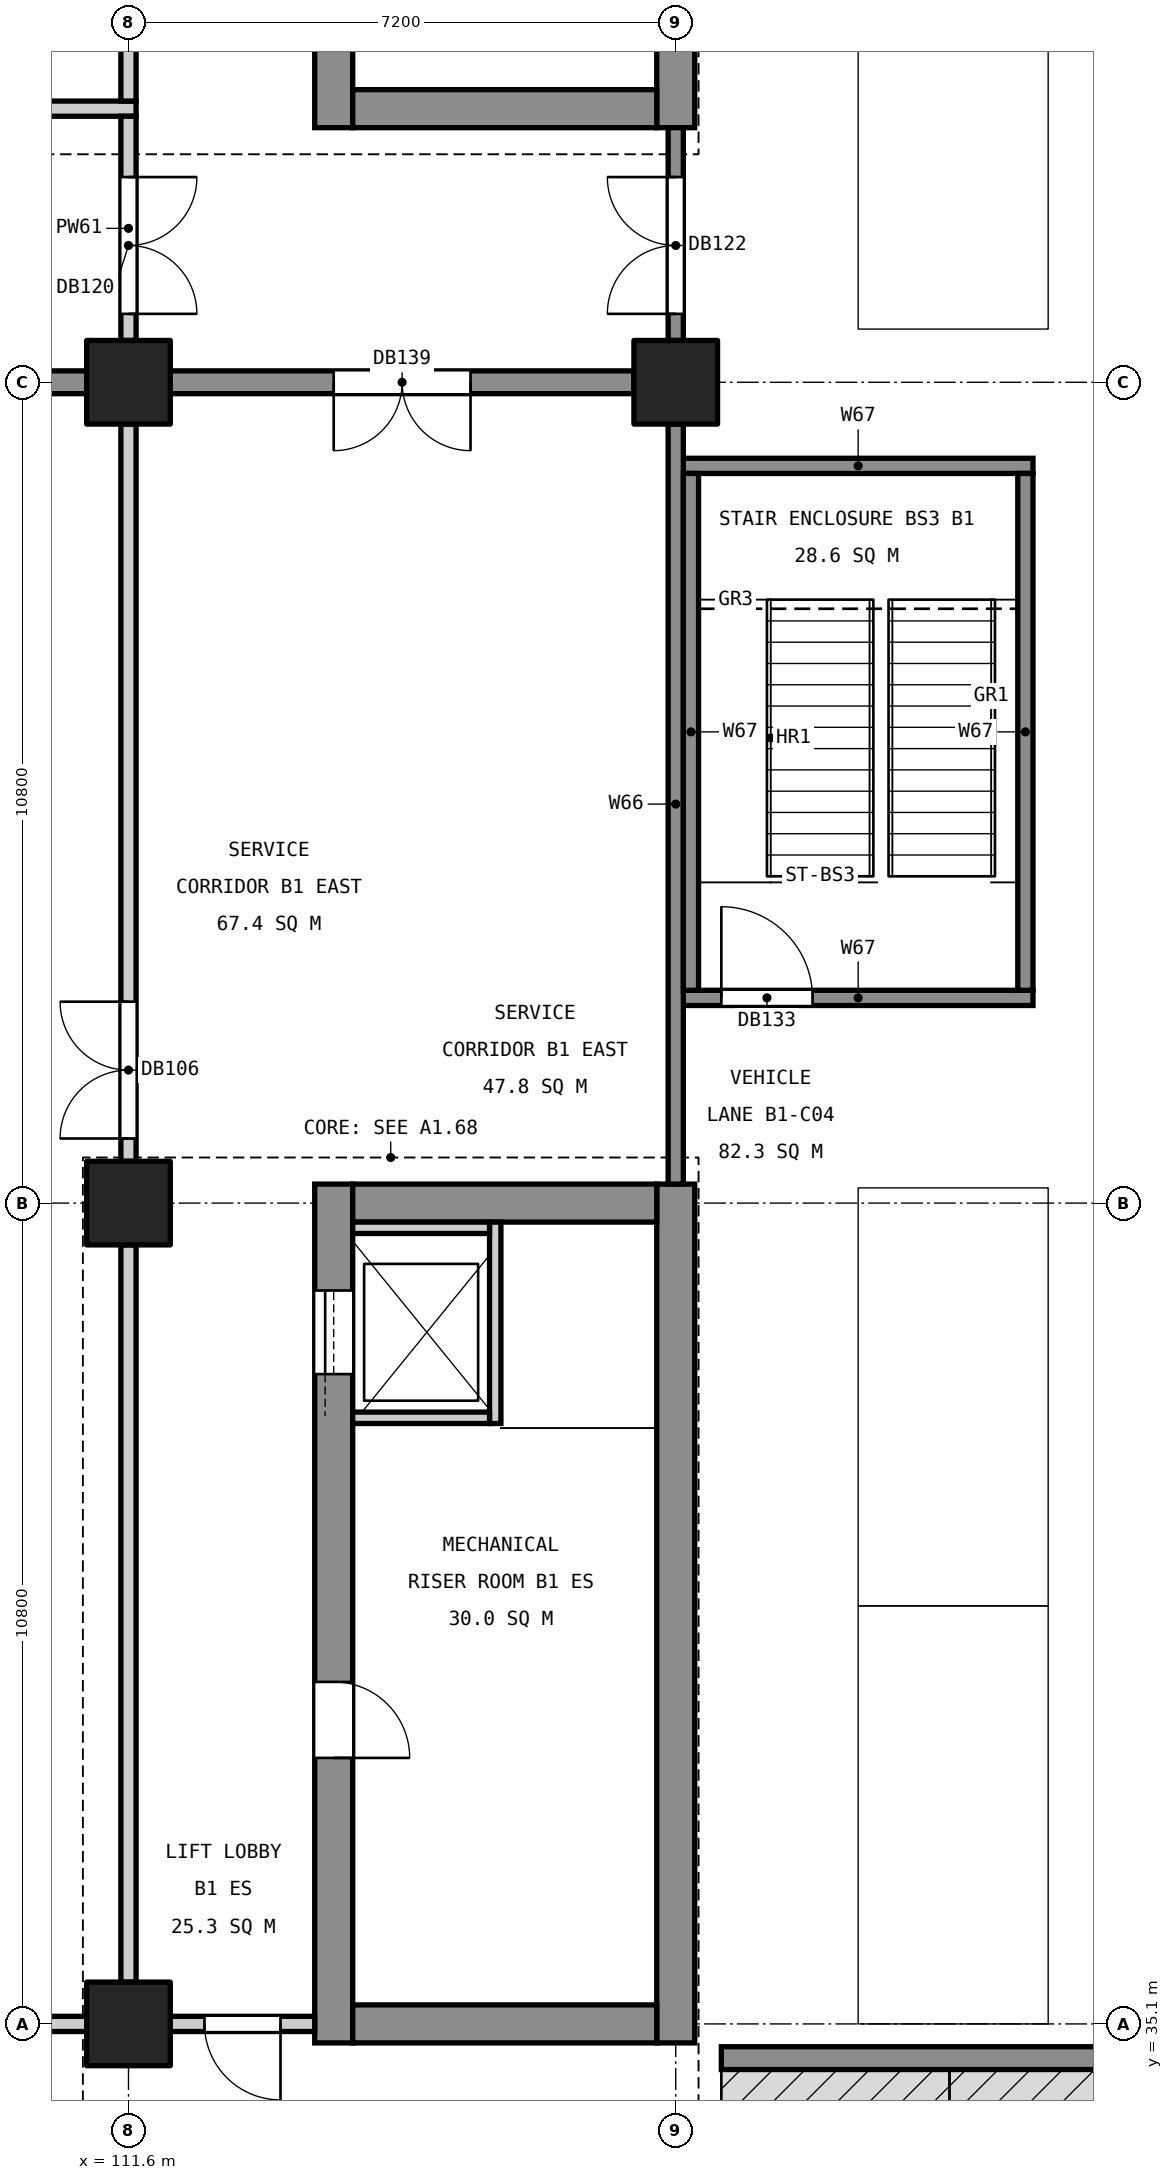
"""IFC4 building model, lengths in metres.
Left out: names, types, materials, properties, quantities, classifications, styles, units other than length and angle.
Written with IfcOpenShell. Run it as: python <this file> out.ifc"""

import sys

from ifc_helpers import new_model, si_unit, direction, frame, frame_2d, origin, origin_2d, place, context, subcontext, project, spatial, polyline, rectangle, outline, extrude, element, fill, save


model = new_model("IFC4")
c1 = context("Model", 3, precision=1e-05, world=origin(), true_north=direction((0.0, 1.0)))
c2 = subcontext(c1, "Body", "Model", "MODEL_VIEW")
j1 = project(units=[si_unit("LENGTHUNIT", "METRE"), si_unit("PLANEANGLEUNIT", "RADIAN")], contexts=[c1])
p1 = place(None, origin())
s1 = spatial("IfcSite", under=j1, at=p1, CompositionType="ELEMENT")
p2 = place(p1, origin())
s2 = spatial("IfcBuilding", under=s1, at=p2, CompositionType="ELEMENT")
p3 = place(p2, frame((0.0, 0.0, -4.8)))
s3 = spatial("IfcBuildingStorey", under=s2, at=p3, CompositionType="ELEMENT", Elevation=-4.8)
for number, where, z_axis, x_axis in (
    (1, (118.8, 56.7, 0.0), (0.0, 0.0, 1.0), (1.0, 0.0, 0.0)),
    (2, (111.6, 35.1, 0.0), (0.0, 0.0, 1.0), (1.0, 0.0, 0.0)),
    (3, (111.6, 45.9, 0.0), (0.0, 0.0, 1.0), (1.0, 0.0, 0.0)),
    (4, (111.6, 56.7, 0.0), (0.0, 0.0, 1.0), (1.0, 0.0, 0.0)),
):
    element("IfcColumn", number, at=place(p3, frame(where, z_axis=z_axis, x_axis=x_axis)), inside=s3, PredefinedType="COLUMN", context=c2, shape_type="SweptSolid", body=[
        extrude(rectangle(XDim=1.1, YDim=1.1, at=origin_2d()), origin(), (0.0, 0.0, 1.0), 4.5),
    ])
p4 = place(p3, frame((118.8, 34.85, 0.0), z_axis=(0.0, 0.0, 1.0), x_axis=(0.0, 1.0, 0.0)))
e5 = element("IfcWall", 5, at=p4, inside=s3, PredefinedType="SHEAR", context=c2, shape_type="SweptSolid", body=[
    extrude(rectangle(XDim=11.3, YDim=0.5, at=frame_2d((5.65, 0.0))), origin(), (0.0, 0.0, 1.0), 4.5),
])
p5 = place(p3, frame((114.3, 34.85, 0.0), z_axis=(0.0, 0.0, 1.0), x_axis=(0.0, 1.0, 0.0)))
e6 = element("IfcWall", 6, at=p5, inside=s3, PredefinedType="SHEAR", context=c2, shape_type="SweptSolid", body=[
    extrude(rectangle(XDim=11.3, YDim=0.5, at=frame_2d((5.65, 0.0))), origin(), (0.0, 0.0, 1.0), 4.5),
])
p6 = place(p5, frame((8.8, 0.0, 0.0)))
e7 = element("IfcOpeningElement", 7, at=p6, cuts=e6, PredefinedType="OPENING", context=c2, shape_type="SweptSolid", body=[
    extrude(rectangle(XDim=1.1, YDim=2.1, at=frame_2d((0.55, 1.05))), frame((0.0, 0.26, 0.0), z_axis=(0.0, -1.0, 0.0), x_axis=(1.0, 0.0, 0.0)), (0.0, 0.0, 1.0), 0.52),
])
p7 = place(p5, frame((3.75, 0.0, 0.0)))
e8 = element("IfcOpeningElement", 8, at=p7, cuts=e6, PredefinedType="OPENING", context=c2, shape_type="SweptSolid", body=[
    extrude(rectangle(XDim=1.0, YDim=2.1, at=frame_2d((0.5, 1.05))), frame((0.0, 0.26, 0.0), z_axis=(0.0, -1.0, 0.0), x_axis=(1.0, 0.0, 0.0)), (0.0, 0.0, 1.0), 0.52),
])
for number, where, z_axis, x_axis in (
    (9, (118.55, 35.1, 0.0), (0.0, 0.0, 1.0), (-1.0, 0.0, 0.0)),
    (10, (118.55, 45.9, 0.0), (0.0, 0.0, 1.0), (-1.0, 0.0, 0.0)),
):
    element("IfcWall", number, at=place(p3, frame(where, z_axis=z_axis, x_axis=x_axis)), inside=s3, PredefinedType="SHEAR", context=c2, shape_type="SweptSolid", body=[
        extrude(rectangle(XDim=4.0, YDim=0.5, at=frame_2d((2.0, 0.0))), origin(), (0.0, 0.0, 1.0), 4.5),
    ])
p8 = place(p3, frame((118.8, 60.05, 0.0), z_axis=(0.0, 0.0, 1.0), x_axis=(0.0, 1.0, 0.0)))
e11 = element("IfcWall", 11, at=p8, inside=s3, PredefinedType="SHEAR", context=c2, shape_type="SweptSolid", body=[
    extrude(rectangle(XDim=14.9, YDim=0.5, at=frame_2d((7.45, 0.0))), origin(), (0.0, 0.0, 1.0), 4.5),
])
p9 = place(p3, frame((114.3, 60.05, 0.0), z_axis=(0.0, 0.0, 1.0), x_axis=(0.0, 1.0, 0.0)))
e12 = element("IfcWall", 12, at=p9, inside=s3, PredefinedType="SHEAR", context=c2, shape_type="SweptSolid", body=[
    extrude(rectangle(XDim=14.9, YDim=0.5, at=frame_2d((7.45, 0.0))), origin(), (0.0, 0.0, 1.0), 4.5),
])
p10 = place(p9, frame((8.85, 0.0, 0.0)))
e13 = element("IfcOpeningElement", 13, at=p10, cuts=e12, PredefinedType="OPENING", context=c2, shape_type="SweptSolid", body=[
    extrude(rectangle(XDim=1.1, YDim=2.1, at=frame_2d((0.55, 1.05))), frame((0.0, 0.26, 0.0), z_axis=(0.0, -1.0, 0.0), x_axis=(1.0, 0.0, 0.0)), (0.0, 0.0, 1.0), 0.52),
])
p11 = place(p9, frame((11.4, 0.0, 0.0)))
e14 = element("IfcOpeningElement", 14, at=p11, cuts=e12, PredefinedType="OPENING", context=c2, shape_type="SweptSolid", body=[
    extrude(rectangle(XDim=1.1, YDim=2.1, at=frame_2d((0.55, 1.05))), frame((0.0, 0.26, 0.0), z_axis=(0.0, -1.0, 0.0), x_axis=(1.0, 0.0, 0.0)), (0.0, 0.0, 1.0), 0.52),
])
p12 = place(p9, frame((3.75, 0.0, 0.0)))
e15 = element("IfcOpeningElement", 15, at=p12, cuts=e12, PredefinedType="OPENING", context=c2, shape_type="SweptSolid", body=[
    extrude(rectangle(XDim=1.0, YDim=2.1, at=frame_2d((0.5, 1.05))), frame((0.0, 0.26, 0.0), z_axis=(0.0, -1.0, 0.0), x_axis=(1.0, 0.0, 0.0)), (0.0, 0.0, 1.0), 0.52),
])
p13 = place(p3, frame((118.55, 60.3, 0.0), z_axis=(0.0, 0.0, 1.0), x_axis=(-1.0, 0.0, 0.0)))
e16 = element("IfcWall", 16, at=p13, inside=s3, PredefinedType="SHEAR", context=c2, shape_type="SweptSolid", body=[
    extrude(rectangle(XDim=4.0, YDim=0.5, at=frame_2d((2.0, 0.0))), origin(), (0.0, 0.0, 1.0), 4.5),
])
p14 = place(p3, frame((118.25, 56.7, 0.0), z_axis=(0.0, 0.0, 1.0), x_axis=(-1.0, 0.0, 0.0)))
e17 = element("IfcWall", 17, at=p14, inside=s3, PredefinedType="SHEAR", context=c2, shape_type="SweptSolid", body=[
    extrude(rectangle(XDim=6.1, YDim=0.3, at=frame_2d((3.05, 0.0))), origin(), (0.0, 0.0, 1.0), 4.5),
])
p15 = place(p14, frame((2.15, 0.0, 0.0)))
e18 = element("IfcOpeningElement", 18, at=p15, cuts=e17, PredefinedType="OPENING", context=c2, shape_type="SweptSolid", body=[
    extrude(rectangle(XDim=1.8, YDim=2.1, at=frame_2d((0.9, 1.05))), frame((0.0, 0.16, 0.0), z_axis=(0.0, -1.0, 0.0), x_axis=(1.0, 0.0, 0.0)), (0.0, 0.0, 1.0), 0.32),
])
p16 = place(p3, frame((111.05, 56.7, 0.0), z_axis=(0.0, 0.0, 1.0), x_axis=(-1.0, 0.0, 0.0)))
e19 = element("IfcWall", 19, at=p16, inside=s3, PredefinedType="SHEAR", context=c2, shape_type="SweptSolid", body=[
    extrude(rectangle(XDim=9.7, YDim=0.3, at=frame_2d((4.85, 0.0))), origin(), (0.0, 0.0, 1.0), 4.5),
])
p17 = place(p3, frame((116.425, 43.0, 0.0), z_axis=(0.0, 0.0, 1.0), x_axis=(0.0, 1.0, 0.0)))
e20 = element("IfcWall", 20, at=p17, inside=s3, PredefinedType="SOLIDWALL", context=c2, shape_type="SweptSolid", body=[
    extrude(rectangle(XDim=2.65, YDim=0.15, at=frame_2d((1.325, 0.0))), origin(), (0.0, 0.0, 1.0), 4.8),
])
for number, where, z_axis, x_axis in (
    (21, (116.35, 43.075, 0.0), (0.0, 0.0, 1.0), (-1.0, 0.0, 0.0)),
    (22, (116.35, 45.575, 0.0), (0.0, 0.0, 1.0), (-1.0, 0.0, 0.0)),
):
    element("IfcWall", number, at=place(p3, frame(where, z_axis=z_axis, x_axis=x_axis)), inside=s3, PredefinedType="SOLIDWALL", context=c2, shape_type="SweptSolid", body=[
        extrude(rectangle(XDim=1.8, YDim=0.15, at=frame_2d((0.9, 0.0))), origin(), (0.0, 0.0, 1.0), 4.8),
    ])
p18 = place(p3, frame((151.2, 34.65, 0.0), z_axis=(0.0, 0.0, 1.0), x_axis=(-1.0, 0.0, 0.0)))
e23 = element("IfcWall", 23, at=p18, inside=s3, PredefinedType="SOLIDWALL", context=c2, shape_type="SweptSolid", body=[
    extrude(outline(polyline([(0.0, 0.0), (31.8, 0.0), (31.8, 1.1), (31.0, 1.167), (30.0, 1.25), (29.0, 1.333), (28.8, 1.35), (28.0, 1.483), (27.0, 1.65), (26.0, 1.817), (25.0, 1.983), (24.0, 2.15), (23.0, 2.317), (22.0, 2.483), (21.0, 2.65), (20.0, 2.817), (19.0, 2.983), (18.0, 3.15), (17.0, 3.317), (16.9, 3.333), (16.0, 3.483), (15.0, 3.65), (14.0, 3.817), (13.0, 3.983), (12.0, 4.15), (11.0, 4.317), (10.0, 4.483), (9.0, 4.65), (8.0, 4.817), (7.0, 4.983), (6.0, 5.15), (5.0, 5.317), (4.0, 5.483), (3.0, 5.65), (2.0, 5.733), (1.0, 5.817), (0.0, 5.9), (0.0, 0.0)])), frame((0.0, 0.15, 0.0), z_axis=(0.0, -1.0, 0.0), x_axis=(1.0, 0.0, 0.0)), (0.0, 0.0, 1.0), 0.3),
])
p19 = place(p3, frame((101.35, 35.1, 0.0), z_axis=(0.0, 0.0, 1.0), x_axis=(1.0, 0.0, 0.0)))
e24 = element("IfcWall", 24, at=p19, inside=s3, PredefinedType="PARTITIONING", context=c2, shape_type="SweptSolid", body=[
    extrude(rectangle(XDim=9.7, YDim=0.2, at=frame_2d((4.85, 0.0))), origin(), (0.0, 0.0, 1.0), 3.7),
])
p20 = place(p3, frame((112.15, 35.1, 0.0), z_axis=(0.0, 0.0, 1.0), x_axis=(1.0, 0.0, 0.0)))
e25 = element("IfcWall", 25, at=p20, inside=s3, PredefinedType="PARTITIONING", context=c2, shape_type="SweptSolid", body=[
    extrude(rectangle(XDim=1.9, YDim=0.2, at=frame_2d((0.95, 0.0))), origin(), (0.0, 0.0, 1.0), 3.7),
])
p21 = place(p20, frame((0.45, 0.0, 0.0)))
e26 = element("IfcOpeningElement", 26, at=p21, cuts=e25, PredefinedType="OPENING", context=c2, shape_type="SweptSolid", body=[
    extrude(rectangle(XDim=1.0, YDim=2.1, at=frame_2d((0.5, 1.05))), frame((0.0, 0.11, 0.0), z_axis=(0.0, -1.0, 0.0), x_axis=(1.0, 0.0, 0.0)), (0.0, 0.0, 1.0), 0.22),
])
p22 = place(p3, frame((118.9, 48.6, 0.0), z_axis=(0.0, 0.0, 1.0), x_axis=(1.0, 0.0, 0.0)))
e27 = element("IfcWall", 27, at=p22, inside=s3, PredefinedType="SOLIDWALL", context=c2, shape_type="SweptSolid", body=[
    extrude(rectangle(XDim=4.6, YDim=0.2, at=frame_2d((2.3, 0.0))), origin(), (0.0, 0.0, 1.0), 4.35),
])
p23 = place(p22, frame((0.5, 0.0, 0.0)))
e28 = element("IfcOpeningElement", 28, at=p23, cuts=e27, PredefinedType="OPENING", context=c2, shape_type="SweptSolid", body=[
    extrude(rectangle(XDim=1.2, YDim=2.1, at=frame_2d((0.6, 1.05))), frame((0.0, 0.11, 0.0), z_axis=(0.0, -1.0, 0.0), x_axis=(1.0, 0.0, 0.0)), (0.0, 0.0, 1.0), 0.22),
])
p24 = place(p3, frame((118.9, 55.6, 0.0), z_axis=(0.0, 0.0, 1.0), x_axis=(1.0, 0.0, 0.0)))
e29 = element("IfcWall", 29, at=p24, inside=s3, PredefinedType="SOLIDWALL", context=c2, shape_type="SweptSolid", body=[
    extrude(rectangle(XDim=4.6, YDim=0.2, at=frame_2d((2.3, 0.0))), origin(), (0.0, 0.0, 1.0), 4.35),
])
p25 = place(p3, frame((100.7, 60.3, 0.0), z_axis=(0.0, 0.0, 1.0), x_axis=(1.0, 0.0, 0.0)))
e30 = element("IfcWall", 30, at=p25, inside=s3, PredefinedType="PARTITIONING", context=c2, shape_type="SweptSolid", body=[
    extrude(rectangle(XDim=11.0, YDim=0.2, at=frame_2d((5.5, 0.0))), origin(), (0.0, 0.0, 1.0), 3.7),
])
p26 = place(p3, frame((111.6, 35.65, 0.0), z_axis=(0.0, 0.0, 1.0), x_axis=(0.0, 1.0, 0.0)))
e31 = element("IfcWall", 31, at=p26, inside=s3, PredefinedType="PARTITIONING", context=c2, shape_type="SweptSolid", body=[
    extrude(rectangle(XDim=9.7, YDim=0.2, at=frame_2d((4.85, 0.0))), origin(), (0.0, 0.0, 1.0), 3.4),
])
p27 = place(p3, frame((111.6, 46.45, 0.0), z_axis=(0.0, 0.0, 1.0), x_axis=(0.0, 1.0, 0.0)))
e32 = element("IfcWall", 32, at=p27, inside=s3, PredefinedType="PARTITIONING", context=c2, shape_type="SweptSolid", body=[
    extrude(rectangle(XDim=9.7, YDim=0.2, at=frame_2d((4.85, 0.0))), origin(), (0.0, 0.0, 1.0), 3.4),
])
p28 = place(p27, frame((0.3, 0.0, 0.0)))
e33 = element("IfcOpeningElement", 33, at=p28, cuts=e32, PredefinedType="OPENING", context=c2, shape_type="SweptSolid", body=[
    extrude(rectangle(XDim=1.8, YDim=2.1, at=frame_2d((0.9, 1.05))), frame((0.0, 0.11, 0.0), z_axis=(0.0, -1.0, 0.0), x_axis=(1.0, 0.0, 0.0)), (0.0, 0.0, 1.0), 0.22),
])
p29 = place(p3, frame((111.6, 57.25, 0.0), z_axis=(0.0, 0.0, 1.0), x_axis=(0.0, 1.0, 0.0)))
e34 = element("IfcWall", 34, at=p29, inside=s3, PredefinedType="PARTITIONING", context=c2, shape_type="SweptSolid", body=[
    extrude(rectangle(XDim=2.95, YDim=0.2, at=frame_2d((1.475, 0.0))), origin(), (0.0, 0.0, 1.0), 3.4),
])
p30 = place(p29, frame((0.35, 0.0, 0.0)))
e35 = element("IfcOpeningElement", 35, at=p30, cuts=e34, PredefinedType="OPENING", context=c2, shape_type="SweptSolid", body=[
    extrude(rectangle(XDim=1.8, YDim=2.1, at=frame_2d((0.9, 1.05))), frame((0.0, 0.11, 0.0), z_axis=(0.0, -1.0, 0.0), x_axis=(1.0, 0.0, 0.0)), (0.0, 0.0, 1.0), 0.22),
])
p31 = place(p3, frame((111.6, 60.4, 0.0), z_axis=(0.0, 0.0, 1.0), x_axis=(0.0, 1.0, 0.0)))
e36 = element("IfcWall", 36, at=p31, inside=s3, PredefinedType="PARTITIONING", context=c2, shape_type="SweptSolid", body=[
    extrude(rectangle(XDim=6.55, YDim=0.2, at=frame_2d((3.275, 0.0))), origin(), (0.0, 0.0, 1.0), 3.4),
])
p32 = place(p3, frame((118.8, 46.15, 0.0), z_axis=(0.0, 0.0, 1.0), x_axis=(0.0, 1.0, 0.0)))
e37 = element("IfcWall", 37, at=p32, inside=s3, PredefinedType="SOLIDWALL", context=c2, shape_type="SweptSolid", body=[
    extrude(rectangle(XDim=10.0, YDim=0.2, at=frame_2d((5.0, 0.0))), origin(), (0.0, 0.0, 1.0), 4.5),
])
p33 = place(p3, frame((118.8, 57.25, 0.0), z_axis=(0.0, 0.0, 1.0), x_axis=(0.0, 1.0, 0.0)))
e38 = element("IfcWall", 38, at=p33, inside=s3, PredefinedType="SOLIDWALL", context=c2, shape_type="SweptSolid", body=[
    extrude(rectangle(XDim=2.8, YDim=0.2, at=frame_2d((1.4, 0.0))), origin(), (0.0, 0.0, 1.0), 4.5),
])
p34 = place(p33, frame((0.35, 0.0, 0.0)))
e39 = element("IfcOpeningElement", 39, at=p34, cuts=e38, PredefinedType="OPENING", context=c2, shape_type="SweptSolid", body=[
    extrude(rectangle(XDim=1.8, YDim=2.1, at=frame_2d((0.9, 1.05))), frame((0.0, 0.11, 0.0), z_axis=(0.0, -1.0, 0.0), x_axis=(1.0, 0.0, 0.0)), (0.0, 0.0, 1.0), 0.22),
])
p35 = place(p3, frame((119.0, 48.7, 0.0), z_axis=(0.0, 0.0, 1.0), x_axis=(0.0, 1.0, 0.0)))
e40 = element("IfcWall", 40, at=p35, inside=s3, PredefinedType="SOLIDWALL", context=c2, shape_type="SweptSolid", body=[
    extrude(rectangle(XDim=6.8, YDim=0.2, at=frame_2d((3.4, 0.0))), origin(), (0.0, 0.0, 1.0), 4.5),
])
p36 = place(p3, frame((123.4, 48.7, 0.0), z_axis=(0.0, 0.0, 1.0), x_axis=(0.0, 1.0, 0.0)))
e41 = element("IfcWall", 41, at=p36, inside=s3, PredefinedType="SOLIDWALL", context=c2, shape_type="SweptSolid", body=[
    extrude(rectangle(XDim=6.8, YDim=0.2, at=frame_2d((3.4, 0.0))), origin(), (0.0, 0.0, 1.0), 4.35),
])
p37 = place(p6, origin())
e42 = element("IfcDoor", 42, at=p37, inside=s3, OperationType="SLIDING_TO_LEFT", PredefinedType="DOOR", context=c2, shape_type="SweptSolid", body=[
    extrude(rectangle(XDim=1.1, YDim=2.1, at=frame_2d((0.55, 1.05))), frame((0.0, 0.025, 0.0), z_axis=(0.0, -1.0, 0.0), x_axis=(1.0, 0.0, 0.0)), (0.0, 0.0, 1.0), 0.05),
])
fill(e7, e42)
p38 = place(p28, origin())
e43 = element("IfcDoor", 43, at=p38, inside=s3, OperationType="DOUBLE_DOOR_SINGLE_SWING", PredefinedType="DOOR", context=c2, shape_type="SweptSolid", body=[
    extrude(rectangle(XDim=1.8, YDim=2.1, at=frame_2d((0.9, 1.05))), frame((0.0, 0.025, 0.0), z_axis=(0.0, -1.0, 0.0), x_axis=(1.0, 0.0, 0.0)), (0.0, 0.0, 1.0), 0.05),
])
fill(e33, e43)
p39 = place(p21, frame((1.0, 0.0, 0.0), z_axis=(0.0, 0.0, 1.0), x_axis=(-1.0, 0.0, 0.0)))
e44 = element("IfcDoor", 44, at=p39, inside=s3, OperationType="SINGLE_SWING_LEFT", PredefinedType="DOOR", context=c2, shape_type="SweptSolid", body=[
    extrude(rectangle(XDim=1.0, YDim=2.1, at=frame_2d((0.5, 1.05))), frame((0.0, 0.025, 0.0), z_axis=(0.0, -1.0, 0.0), x_axis=(1.0, 0.0, 0.0)), (0.0, 0.0, 1.0), 0.05),
])
fill(e26, e44)
p40 = place(p30, frame((1.8, 0.0, 0.0), z_axis=(0.0, 0.0, 1.0), x_axis=(-1.0, 0.0, 0.0)))
e45 = element("IfcDoor", 45, at=p40, inside=s3, OperationType="DOUBLE_DOOR_SINGLE_SWING", PredefinedType="DOOR", context=c2, shape_type="SweptSolid", body=[
    extrude(rectangle(XDim=1.8, YDim=2.1, at=frame_2d((0.9, 1.05))), frame((0.0, 0.025, 0.0), z_axis=(0.0, -1.0, 0.0), x_axis=(1.0, 0.0, 0.0)), (0.0, 0.0, 1.0), 0.05),
])
fill(e35, e45)
p41 = place(p34, origin())
e46 = element("IfcDoor", 46, at=p41, inside=s3, OperationType="DOUBLE_DOOR_SINGLE_SWING", PredefinedType="DOOR", context=c2, shape_type="SweptSolid", body=[
    extrude(rectangle(XDim=1.8, YDim=2.1, at=frame_2d((0.9, 1.05))), frame((0.0, 0.025, 0.0), z_axis=(0.0, -1.0, 0.0), x_axis=(1.0, 0.0, 0.0)), (0.0, 0.0, 1.0), 0.05),
])
fill(e39, e46)
p42 = place(p7, frame((1.0, 0.0, 0.0), z_axis=(0.0, 0.0, 1.0), x_axis=(-1.0, 0.0, 0.0)))
e47 = element("IfcDoor", 47, at=p42, inside=s3, OperationType="SINGLE_SWING_RIGHT", PredefinedType="DOOR", context=c2, shape_type="SweptSolid", body=[
    extrude(rectangle(XDim=1.0, YDim=2.1, at=frame_2d((0.5, 1.05))), frame((0.0, 0.025, 0.0), z_axis=(0.0, -1.0, 0.0), x_axis=(1.0, 0.0, 0.0)), (0.0, 0.0, 1.0), 0.05),
])
fill(e8, e47)
p43 = place(p23, origin())
e48 = element("IfcDoor", 48, at=p43, inside=s3, OperationType="SINGLE_SWING_LEFT", PredefinedType="DOOR", context=c2, shape_type="SweptSolid", body=[
    extrude(rectangle(XDim=1.2, YDim=2.1, at=frame_2d((0.6, 1.05))), frame((0.0, 0.025, 0.0), z_axis=(0.0, -1.0, 0.0), x_axis=(1.0, 0.0, 0.0)), (0.0, 0.0, 1.0), 0.05),
])
fill(e28, e48)
p44 = place(p15, origin())
e49 = element("IfcDoor", 49, at=p44, inside=s3, OperationType="DOUBLE_DOOR_SINGLE_SWING", PredefinedType="DOOR", context=c2, shape_type="SweptSolid", body=[
    extrude(rectangle(XDim=1.8, YDim=2.1, at=frame_2d((0.9, 1.05))), frame((0.0, 0.025, 0.0), z_axis=(0.0, -1.0, 0.0), x_axis=(1.0, 0.0, 0.0)), (0.0, 0.0, 1.0), 0.05),
])
fill(e18, e49)
save(model, sys.argv[1])
